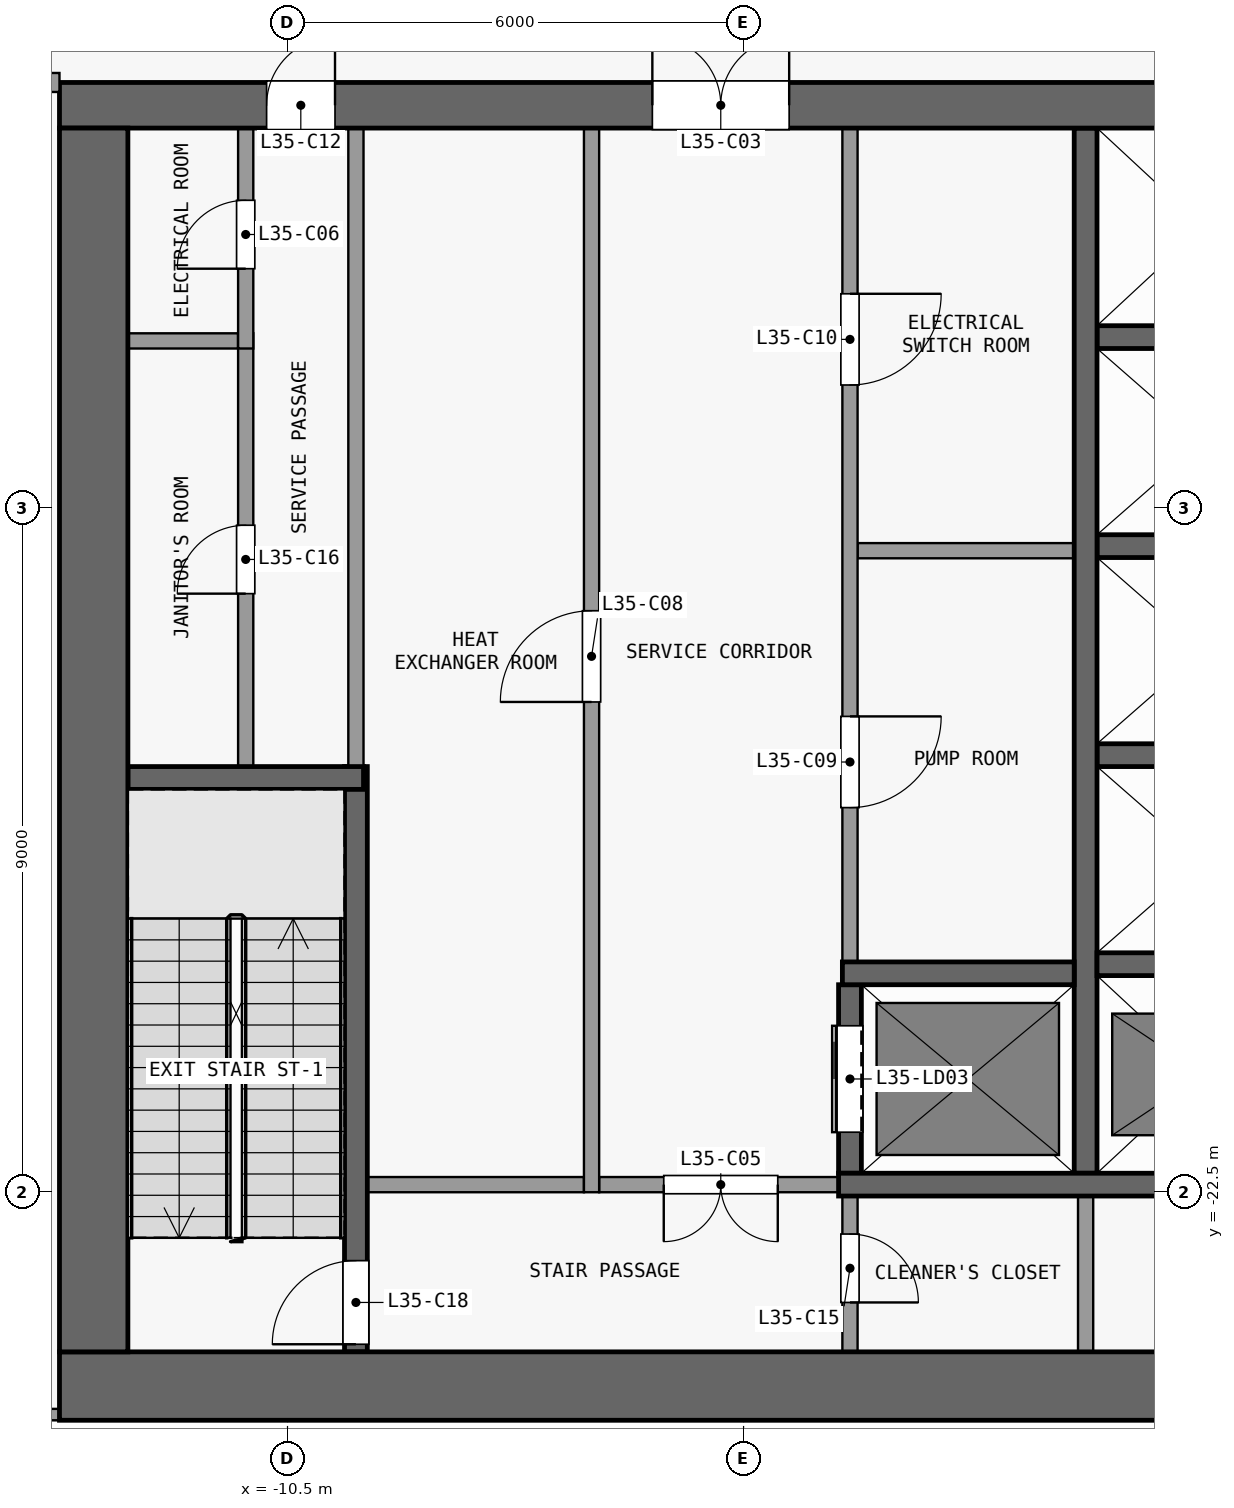
"""IFC4 building model, lengths in metres.
Left out: names, types, materials, properties, quantities, classifications, styles, units other than length and angle.
Written with IfcOpenShell. Run it as: python <this file> out.ifc"""

import sys

from ifc_helpers import new_model, si_unit, direction, frame, frame_2d, origin, place, context, subcontext, project, spatial, rectangle, extrude, element, fill, save


model = new_model("IFC4")
c1 = context("Model", 3, precision=1e-05, world=origin(), true_north=direction((0.0, 1.0)))
c2 = subcontext(c1, "Body", "Model", "MODEL_VIEW")
j1 = project(units=[si_unit("LENGTHUNIT", "METRE"), si_unit("PLANEANGLEUNIT", "RADIAN")], contexts=[c1])
p1 = place(None, origin())
s1 = spatial("IfcSite", under=j1, at=p1, CompositionType="ELEMENT")
p2 = place(p1, origin())
s2 = spatial("IfcBuilding", under=s1, at=p2, CompositionType="ELEMENT")
p3 = place(p2, frame((0.0, 0.0, 143.9)))
s3 = spatial("IfcBuildingStorey", under=s2, at=p3, CompositionType="ELEMENT", Elevation=143.9)
p4 = place(p3, frame((-13.5, -25.05, 0.0), z_axis=(0.0, 0.0, 1.0), x_axis=(1.0, 0.0, 0.0)))
e1 = element("IfcWall", 1, at=p4, inside=s3, PredefinedType="SHEAR", context=c2, shape_type="SweptSolid", body=[
    extrude(rectangle(XDim=27.0, YDim=0.9, at=frame_2d((13.5, 0.0))), origin(), (0.0, 0.0, 1.0), 5.0),
])
p5 = place(p3, frame((-13.5, -8.2, 0.0), z_axis=(0.0, 0.0, 1.0), x_axis=(1.0, 0.0, 0.0)))
e2 = element("IfcWall", 2, at=p5, inside=s3, PredefinedType="SHEAR", context=c2, shape_type="SweptSolid", body=[
    extrude(rectangle(XDim=27.0, YDim=0.6, at=frame_2d((13.5, 0.0))), origin(), (0.0, 0.0, 1.0), 5.0),
])
p6 = place(p5, frame((7.8, 0.0, 0.0)))
e3 = element("IfcOpeningElement", 3, at=p6, cuts=e2, PredefinedType="OPENING", context=c2, shape_type="SweptSolid", body=[
    extrude(rectangle(XDim=1.8, YDim=2.1, at=frame_2d((0.9, 1.05))), frame((0.0, 0.31, 0.0), z_axis=(0.0, -1.0, 0.0), x_axis=(1.0, 0.0, 0.0)), (0.0, 0.0, 1.0), 0.62),
])
p7 = place(p5, frame((17.4, 0.0, 0.0)))
e4 = element("IfcOpeningElement", 4, at=p7, cuts=e2, PredefinedType="OPENING", context=c2, shape_type="SweptSolid", body=[
    extrude(rectangle(XDim=1.8, YDim=2.1, at=frame_2d((0.9, 1.05))), frame((0.0, 0.31, 0.0), z_axis=(0.0, -1.0, 0.0), x_axis=(1.0, 0.0, 0.0)), (0.0, 0.0, 1.0), 0.62),
])
p8 = place(p5, frame((2.725, 0.0, 0.0)))
e5 = element("IfcOpeningElement", 5, at=p8, cuts=e2, PredefinedType="OPENING", context=c2, shape_type="SweptSolid", body=[
    extrude(rectangle(XDim=0.9, YDim=2.1, at=frame_2d((0.45, 1.05))), frame((0.0, 0.31, 0.0), z_axis=(0.0, -1.0, 0.0), x_axis=(1.0, 0.0, 0.0)), (0.0, 0.0, 1.0), 0.62),
])
p9 = place(p5, frame((23.375, 0.0, 0.0)))
e6 = element("IfcOpeningElement", 6, at=p9, cuts=e2, PredefinedType="OPENING", context=c2, shape_type="SweptSolid", body=[
    extrude(rectangle(XDim=0.9, YDim=2.1, at=frame_2d((0.45, 1.05))), frame((0.0, 0.31, 0.0), z_axis=(0.0, -1.0, 0.0), x_axis=(1.0, 0.0, 0.0)), (0.0, 0.0, 1.0), 0.62),
])
p10 = place(p3, frame((-13.05, -24.6, 0.0), z_axis=(0.0, 0.0, 1.0), x_axis=(0.0, 1.0, 0.0)))
e7 = element("IfcWall", 7, at=p10, inside=s3, PredefinedType="SHEAR", context=c2, shape_type="SweptSolid", body=[
    extrude(rectangle(XDim=16.1, YDim=0.9, at=frame_2d((8.05, 0.0))), origin(), (0.0, 0.0, 1.0), 5.0),
])
p11 = place(p3, frame((-9.45, -22.4, 0.0), z_axis=(0.0, 0.0, 1.0), x_axis=(1.0, 0.0, 0.0)))
e8 = element("IfcWall", 8, at=p11, inside=s3, PredefinedType="PARTITIONING", context=c2, shape_type="SweptSolid", body=[
    extrude(rectangle(XDim=2.85, YDim=0.2, at=frame_2d((1.425, 0.0))), origin(), (0.0, 0.0, 1.0), 5.0),
])
p12 = place(p3, frame((-3.25, -22.4, 0.0), z_axis=(0.0, 0.0, 1.0), x_axis=(-1.0, 0.0, 0.0)))
e9 = element("IfcWall", 9, at=p12, inside=s3, PredefinedType="PARTITIONING", context=c2, shape_type="SweptSolid", body=[
    extrude(rectangle(XDim=3.15, YDim=0.2, at=frame_2d((1.575, 0.0))), origin(), (0.0, 0.0, 1.0), 5.0),
])
p13 = place(p12, frame((0.8, 0.0, 0.0)))
e10 = element("IfcOpeningElement", 10, at=p13, cuts=e9, PredefinedType="OPENING", context=c2, shape_type="SweptSolid", body=[
    extrude(rectangle(XDim=1.5, YDim=2.1, at=frame_2d((0.75, 1.05))), frame((0.0, 0.11, 0.0), z_axis=(0.0, -1.0, 0.0), x_axis=(1.0, 0.0, 0.0)), (0.0, 0.0, 1.0), 0.22),
])
p14 = place(p3, frame((-3.25, -22.4, 0.0), z_axis=(0.0, 0.0, 1.0), x_axis=(1.0, 0.0, 0.0)))
e11 = element("IfcWall", 11, at=p14, inside=s3, PredefinedType="SHEAR", context=c2, shape_type="SweptSolid", body=[
    extrude(rectangle(XDim=6.2, YDim=0.3, at=frame_2d((3.1, 0.0))), origin(), (0.0, 0.0, 1.0), 5.0),
])
p15 = place(p3, frame((-3.2, -19.62, 0.0), z_axis=(0.0, 0.0, 1.0), x_axis=(1.0, 0.0, 0.0)))
e12 = element("IfcWall", 12, at=p15, inside=s3, PredefinedType="SHEAR", context=c2, shape_type="SweptSolid", body=[
    extrude(rectangle(XDim=3.05, YDim=0.3, at=frame_2d((1.525, 0.0))), origin(), (0.0, 0.0, 1.0), 5.0),
])
p16 = place(p3, frame((0.15, -19.5, 0.0), z_axis=(0.0, 0.0, 1.0), x_axis=(1.0, 0.0, 0.0)))
e13 = element("IfcWall", 13, at=p16, inside=s3, PredefinedType="SHEAR", context=c2, shape_type="SweptSolid", body=[
    extrude(rectangle(XDim=2.8, YDim=0.3, at=frame_2d((1.4, 0.0))), origin(), (0.0, 0.0, 1.0), 5.0),
])
p17 = place(p3, frame((-12.6, -17.05, 0.0), z_axis=(0.0, 0.0, 1.0), x_axis=(1.0, 0.0, 0.0)))
e14 = element("IfcWall", 14, at=p17, inside=s3, PredefinedType="SHEAR", context=c2, shape_type="SweptSolid", body=[
    extrude(rectangle(XDim=3.1, YDim=0.3, at=frame_2d((1.55, 0.0))), origin(), (0.0, 0.0, 1.0), 5.0),
])
p18 = place(p3, frame((0.15, -16.75, 0.0), z_axis=(0.0, 0.0, 1.0), x_axis=(1.0, 0.0, 0.0)))
e15 = element("IfcWall", 15, at=p18, inside=s3, PredefinedType="SHEAR", context=c2, shape_type="SweptSolid", body=[
    extrude(rectangle(XDim=2.8, YDim=0.3, at=frame_2d((1.4, 0.0))), origin(), (0.0, 0.0, 1.0), 5.0),
])
p19 = place(p3, frame((-3.0, -14.06, 0.0), z_axis=(0.0, 0.0, 1.0), x_axis=(1.0, 0.0, 0.0)))
e16 = element("IfcWall", 16, at=p19, inside=s3, PredefinedType="PARTITIONING", context=c2, shape_type="SweptSolid", body=[
    extrude(rectangle(XDim=2.85, YDim=0.2, at=frame_2d((1.425, 0.0))), origin(), (0.0, 0.0, 1.0), 5.0),
])
p20 = place(p3, frame((0.15, -14.0, 0.0), z_axis=(0.0, 0.0, 1.0), x_axis=(1.0, 0.0, 0.0)))
e17 = element("IfcWall", 17, at=p20, inside=s3, PredefinedType="SHEAR", context=c2, shape_type="SweptSolid", body=[
    extrude(rectangle(XDim=2.8, YDim=0.3, at=frame_2d((1.4, 0.0))), origin(), (0.0, 0.0, 1.0), 5.0),
])
p21 = place(p3, frame((-12.6, -11.3, 0.0), z_axis=(0.0, 0.0, 1.0), x_axis=(1.0, 0.0, 0.0)))
e18 = element("IfcWall", 18, at=p21, inside=s3, PredefinedType="PARTITIONING", context=c2, shape_type="SweptSolid", body=[
    extrude(rectangle(XDim=1.45, YDim=0.2, at=frame_2d((0.725, 0.0))), origin(), (0.0, 0.0, 1.0), 5.0),
])
p22 = place(p3, frame((0.15, -11.25, 0.0), z_axis=(0.0, 0.0, 1.0), x_axis=(1.0, 0.0, 0.0)))
e19 = element("IfcWall", 19, at=p22, inside=s3, PredefinedType="SHEAR", context=c2, shape_type="SweptSolid", body=[
    extrude(rectangle(XDim=2.8, YDim=0.3, at=frame_2d((1.4, 0.0))), origin(), (0.0, 0.0, 1.0), 5.0),
])
p23 = place(p3, frame((-11.05, -16.9, 0.0), z_axis=(0.0, 0.0, 1.0), x_axis=(0.0, 1.0, 0.0)))
e20 = element("IfcWall", 20, at=p23, inside=s3, PredefinedType="PARTITIONING", context=c2, shape_type="SweptSolid", body=[
    extrude(rectangle(XDim=5.7, YDim=0.2, at=frame_2d((2.85, 0.0))), origin(), (0.0, 0.0, 1.0), 5.0),
])
p24 = place(p23, frame((2.275, 0.0, 0.0)))
e21 = element("IfcOpeningElement", 21, at=p24, cuts=e20, PredefinedType="OPENING", context=c2, shape_type="SweptSolid", body=[
    extrude(rectangle(XDim=0.9, YDim=2.1, at=frame_2d((0.45, 1.05))), frame((0.0, 0.11, 0.0), z_axis=(0.0, -1.0, 0.0), x_axis=(1.0, 0.0, 0.0)), (0.0, 0.0, 1.0), 0.22),
])
p25 = place(p3, frame((-11.05, -11.4, 0.0), z_axis=(0.0, 0.0, 1.0), x_axis=(0.0, 1.0, 0.0)))
e22 = element("IfcWall", 22, at=p25, inside=s3, PredefinedType="PARTITIONING", context=c2, shape_type="SweptSolid", body=[
    extrude(rectangle(XDim=2.9, YDim=0.2, at=frame_2d((1.45, 0.0))), origin(), (0.0, 0.0, 1.0), 5.0),
])
p26 = place(p25, frame((1.05, 0.0, 0.0)))
e23 = element("IfcOpeningElement", 23, at=p26, cuts=e22, PredefinedType="OPENING", context=c2, shape_type="SweptSolid", body=[
    extrude(rectangle(XDim=0.9, YDim=2.1, at=frame_2d((0.45, 1.05))), frame((0.0, 0.11, 0.0), z_axis=(0.0, -1.0, 0.0), x_axis=(1.0, 0.0, 0.0)), (0.0, 0.0, 1.0), 0.22),
])
p27 = place(p3, frame((-9.6, -24.6, 0.0), z_axis=(0.0, 0.0, 1.0), x_axis=(0.0, 1.0, 0.0)))
e24 = element("IfcWall", 24, at=p27, inside=s3, PredefinedType="SHEAR", context=c2, shape_type="SweptSolid", body=[
    extrude(rectangle(XDim=7.7, YDim=0.3, at=frame_2d((3.85, 0.0))), origin(), (0.0, 0.0, 1.0), 5.0),
])
p28 = place(p27, frame((0.1, 0.0, 0.0)))
e25 = element("IfcOpeningElement", 25, at=p28, cuts=e24, PredefinedType="OPENING", context=c2, shape_type="SweptSolid", body=[
    extrude(rectangle(XDim=1.1, YDim=2.1, at=frame_2d((0.55, 1.05))), frame((0.0, 0.16, 0.0), z_axis=(0.0, -1.0, 0.0), x_axis=(1.0, 0.0, 0.0)), (0.0, 0.0, 1.0), 0.32),
])
p29 = place(p3, frame((-9.6, -16.9, 0.0), z_axis=(0.0, 0.0, 1.0), x_axis=(0.0, 1.0, 0.0)))
e26 = element("IfcWall", 26, at=p29, inside=s3, PredefinedType="PARTITIONING", context=c2, shape_type="SweptSolid", body=[
    extrude(rectangle(XDim=8.4, YDim=0.2, at=frame_2d((4.2, 0.0))), origin(), (0.0, 0.0, 1.0), 5.0),
])
p30 = place(p3, frame((-6.5, -22.5, 0.0), z_axis=(0.0, 0.0, 1.0), x_axis=(0.0, 1.0, 0.0)))
e27 = element("IfcWall", 27, at=p30, inside=s3, PredefinedType="PARTITIONING", context=c2, shape_type="SweptSolid", body=[
    extrude(rectangle(XDim=14.0, YDim=0.2, at=frame_2d((7.0, 0.0))), origin(), (0.0, 0.0, 1.0), 5.0),
])
p31 = place(p30, frame((6.45, 0.0, 0.0)))
e28 = element("IfcOpeningElement", 28, at=p31, cuts=e27, PredefinedType="OPENING", context=c2, shape_type="SweptSolid", body=[
    extrude(rectangle(XDim=1.2, YDim=2.1, at=frame_2d((0.6, 1.05))), frame((0.0, 0.11, 0.0), z_axis=(0.0, -1.0, 0.0), x_axis=(1.0, 0.0, 0.0)), (0.0, 0.0, 1.0), 0.22),
])
p32 = place(p3, frame((-3.1, -22.55, 0.0), z_axis=(0.0, 0.0, 1.0), x_axis=(0.0, -1.0, 0.0)))
e29 = element("IfcWall", 29, at=p32, inside=s3, PredefinedType="PARTITIONING", context=c2, shape_type="SweptSolid", body=[
    extrude(rectangle(XDim=2.05, YDim=0.2, at=frame_2d((1.025, 0.0))), origin(), (0.0, 0.0, 1.0), 5.0),
])
p33 = place(p32, frame((0.5, 0.0, 0.0)))
e30 = element("IfcOpeningElement", 30, at=p33, cuts=e29, PredefinedType="OPENING", context=c2, shape_type="SweptSolid", body=[
    extrude(rectangle(XDim=0.9, YDim=2.1, at=frame_2d((0.45, 1.05))), frame((0.0, 0.11, 0.0), z_axis=(0.0, -1.0, 0.0), x_axis=(1.0, 0.0, 0.0)), (0.0, 0.0, 1.0), 0.22),
])
p34 = place(p3, frame((-3.1, -22.25, 0.0), z_axis=(0.0, 0.0, 1.0), x_axis=(0.0, 1.0, 0.0)))
e31 = element("IfcWall", 31, at=p34, inside=s3, PredefinedType="SHEAR", context=c2, shape_type="SweptSolid", body=[
    extrude(rectangle(XDim=2.48, YDim=0.3, at=frame_2d((1.24, 0.0))), origin(), (0.0, 0.0, 1.0), 5.0),
])
p35 = place(p34, frame((0.54, 0.0, 0.0)))
e32 = element("IfcOpeningElement", 32, at=p35, cuts=e31, PredefinedType="OPENING", context=c2, shape_type="SweptSolid", body=[
    extrude(rectangle(XDim=1.4, YDim=2.1, at=frame_2d((0.7, 1.05))), frame((0.0, 0.16, 0.0), z_axis=(0.0, -1.0, 0.0), x_axis=(1.0, 0.0, 0.0)), (0.0, 0.0, 1.0), 0.32),
])
p36 = place(p3, frame((-3.1, -8.5, 0.0), z_axis=(0.0, 0.0, 1.0), x_axis=(0.0, -1.0, 0.0)))
e33 = element("IfcWall", 33, at=p36, inside=s3, PredefinedType="PARTITIONING", context=c2, shape_type="SweptSolid", body=[
    extrude(rectangle(XDim=10.97, YDim=0.2, at=frame_2d((5.485, 0.0))), origin(), (0.0, 0.0, 1.0), 5.0),
])
p37 = place(p36, frame((7.74, 0.0, 0.0)))
e34 = element("IfcOpeningElement", 34, at=p37, cuts=e33, PredefinedType="OPENING", context=c2, shape_type="SweptSolid", body=[
    extrude(rectangle(XDim=1.2, YDim=2.1, at=frame_2d((0.6, 1.05))), frame((0.0, 0.11, 0.0), z_axis=(0.0, -1.0, 0.0), x_axis=(1.0, 0.0, 0.0)), (0.0, 0.0, 1.0), 0.22),
])
p38 = place(p36, frame((2.18, 0.0, 0.0)))
e35 = element("IfcOpeningElement", 35, at=p38, cuts=e33, PredefinedType="OPENING", context=c2, shape_type="SweptSolid", body=[
    extrude(rectangle(XDim=1.2, YDim=2.1, at=frame_2d((0.6, 1.05))), frame((0.0, 0.11, 0.0), z_axis=(0.0, -1.0, 0.0), x_axis=(1.0, 0.0, 0.0)), (0.0, 0.0, 1.0), 0.22),
])
p39 = place(p3, frame((0.0, -24.6, 0.0), z_axis=(0.0, 0.0, 1.0), x_axis=(0.0, 1.0, 0.0)))
e36 = element("IfcWall", 36, at=p39, inside=s3, PredefinedType="PARTITIONING", context=c2, shape_type="SweptSolid", body=[
    extrude(rectangle(XDim=2.05, YDim=0.2, at=frame_2d((1.025, 0.0))), origin(), (0.0, 0.0, 1.0), 5.0),
])
p40 = place(p3, frame((0.0, -22.25, 0.0), z_axis=(0.0, 0.0, 1.0), x_axis=(0.0, 1.0, 0.0)))
e37 = element("IfcWall", 37, at=p40, inside=s3, PredefinedType="SHEAR", context=c2, shape_type="SweptSolid", body=[
    extrude(rectangle(XDim=13.75, YDim=0.3, at=frame_2d((6.875, 0.0))), origin(), (0.0, 0.0, 1.0), 5.0),
])
p41 = place(p3, frame((-13.5, -25.425, 0.0), z_axis=(0.0, 0.0, 1.0), x_axis=(-1.0, 0.0, 0.0)))
e38 = element("IfcWall", 38, at=p41, inside=s3, PredefinedType="SOLIDWALL", context=c2, shape_type="SweptSolid", body=[
    extrude(rectangle(XDim=8.5, YDim=0.15, at=frame_2d((4.25, 0.0))), origin(), (0.0, 0.0, 1.0), 5.0),
])
p42 = place(p41, frame((3.95, 0.0, 1.2)))
e39 = element("IfcOpeningElement", 39, at=p42, cuts=e38, PredefinedType="OPENING", context=c2, shape_type="SweptSolid", body=[
    extrude(rectangle(XDim=3.6, YDim=3.0, at=frame_2d((1.8, 1.5))), frame((0.0, 0.085, 0.0), z_axis=(0.0, -1.0, 0.0), x_axis=(1.0, 0.0, 0.0)), (0.0, 0.0, 1.0), 0.17),
])
p43 = place(p41, frame((0.5, 0.0, 1.2)))
e40 = element("IfcOpeningElement", 40, at=p43, cuts=e38, PredefinedType="OPENING", context=c2, shape_type="SweptSolid", body=[
    extrude(rectangle(XDim=2.0, YDim=3.0, at=frame_2d((1.0, 1.5))), frame((0.0, 0.085, 0.0), z_axis=(0.0, -1.0, 0.0), x_axis=(1.0, 0.0, 0.0)), (0.0, 0.0, 1.0), 0.17),
])
p44 = place(p3, frame((-25.35, -7.9, 0.0), z_axis=(0.0, 0.0, 1.0), x_axis=(1.0, 0.0, 0.0)))
e41 = element("IfcWall", 41, at=p44, inside=s3, PredefinedType="PARTITIONING", context=c2, shape_type="SweptSolid", body=[
    extrude(rectangle(XDim=11.85, YDim=0.25, at=frame_2d((5.925, 0.0))), origin(), (0.0, 0.0, 1.0), 5.0),
])
p45 = place(p44, frame((5.3, 0.0, 0.0)))
e42 = element("IfcOpeningElement", 42, at=p45, cuts=e41, PredefinedType="OPENING", context=c2, shape_type="SweptSolid", body=[
    extrude(rectangle(XDim=1.2, YDim=2.1, at=frame_2d((0.6, 1.05))), frame((0.0, 0.135, 0.0), z_axis=(0.0, -1.0, 0.0), x_axis=(1.0, 0.0, 0.0)), (0.0, 0.0, 1.0), 0.27),
])
p46 = place(p35, origin())
e43 = element("IfcDoor", 43, at=p46, inside=s3, OperationType="DOUBLE_DOOR_SLIDING", PredefinedType="DOOR", context=c2, shape_type="SweptSolid", body=[
    extrude(rectangle(XDim=1.4, YDim=2.1, at=frame_2d((0.7, 1.05))), frame((0.0, 0.025, 0.0), z_axis=(0.0, -1.0, 0.0), x_axis=(1.0, 0.0, 0.0)), (0.0, 0.0, 1.0), 0.05),
])
fill(e32, e43)
p47 = place(p6, origin())
e44 = element("IfcDoor", 44, at=p47, inside=s3, OperationType="DOUBLE_DOOR_SINGLE_SWING", PredefinedType="DOOR", context=c2, shape_type="SweptSolid", body=[
    extrude(rectangle(XDim=1.8, YDim=2.1, at=frame_2d((0.9, 1.05))), frame((0.0, 0.025, 0.0), z_axis=(0.0, -1.0, 0.0), x_axis=(1.0, 0.0, 0.0)), (0.0, 0.0, 1.0), 0.05),
])
fill(e3, e44)
p48 = place(p13, origin())
e45 = element("IfcDoor", 45, at=p48, inside=s3, OperationType="DOUBLE_DOOR_SINGLE_SWING", PredefinedType="DOOR", context=c2, shape_type="SweptSolid", body=[
    extrude(rectangle(XDim=1.5, YDim=2.1, at=frame_2d((0.75, 1.05))), frame((0.0, 0.025, 0.0), z_axis=(0.0, -1.0, 0.0), x_axis=(1.0, 0.0, 0.0)), (0.0, 0.0, 1.0), 0.05),
])
fill(e10, e45)
p49 = place(p26, origin())
e46 = element("IfcDoor", 46, at=p49, inside=s3, OperationType="SINGLE_SWING_LEFT", PredefinedType="DOOR", context=c2, shape_type="SweptSolid", body=[
    extrude(rectangle(XDim=0.9, YDim=2.1, at=frame_2d((0.45, 1.05))), frame((0.0, 0.025, 0.0), z_axis=(0.0, -1.0, 0.0), x_axis=(1.0, 0.0, 0.0)), (0.0, 0.0, 1.0), 0.05),
])
fill(e23, e46)
p50 = place(p31, origin())
e47 = element("IfcDoor", 47, at=p50, inside=s3, OperationType="SINGLE_SWING_LEFT", PredefinedType="DOOR", context=c2, shape_type="SweptSolid", body=[
    extrude(rectangle(XDim=1.2, YDim=2.1, at=frame_2d((0.6, 1.05))), frame((0.0, 0.025, 0.0), z_axis=(0.0, -1.0, 0.0), x_axis=(1.0, 0.0, 0.0)), (0.0, 0.0, 1.0), 0.05),
])
fill(e28, e47)
p51 = place(p37, origin())
e48 = element("IfcDoor", 48, at=p51, inside=s3, OperationType="SINGLE_SWING_LEFT", PredefinedType="DOOR", context=c2, shape_type="SweptSolid", body=[
    extrude(rectangle(XDim=1.2, YDim=2.1, at=frame_2d((0.6, 1.05))), frame((0.0, 0.025, 0.0), z_axis=(0.0, -1.0, 0.0), x_axis=(1.0, 0.0, 0.0)), (0.0, 0.0, 1.0), 0.05),
])
fill(e34, e48)
p52 = place(p38, origin())
e49 = element("IfcDoor", 49, at=p52, inside=s3, OperationType="SINGLE_SWING_LEFT", PredefinedType="DOOR", context=c2, shape_type="SweptSolid", body=[
    extrude(rectangle(XDim=1.2, YDim=2.1, at=frame_2d((0.6, 1.05))), frame((0.0, 0.025, 0.0), z_axis=(0.0, -1.0, 0.0), x_axis=(1.0, 0.0, 0.0)), (0.0, 0.0, 1.0), 0.05),
])
fill(e35, e49)
p53 = place(p8, origin())
e50 = element("IfcDoor", 50, at=p53, inside=s3, OperationType="SINGLE_SWING_RIGHT", PredefinedType="DOOR", context=c2, shape_type="SweptSolid", body=[
    extrude(rectangle(XDim=0.9, YDim=2.1, at=frame_2d((0.45, 1.05))), frame((0.0, 0.025, 0.0), z_axis=(0.0, -1.0, 0.0), x_axis=(1.0, 0.0, 0.0)), (0.0, 0.0, 1.0), 0.05),
])
fill(e5, e50)
p54 = place(p33, origin())
e51 = element("IfcDoor", 51, at=p54, inside=s3, OperationType="SINGLE_SWING_RIGHT", PredefinedType="DOOR", context=c2, shape_type="SweptSolid", body=[
    extrude(rectangle(XDim=0.9, YDim=2.1, at=frame_2d((0.45, 1.05))), frame((0.0, 0.025, 0.0), z_axis=(0.0, -1.0, 0.0), x_axis=(1.0, 0.0, 0.0)), (0.0, 0.0, 1.0), 0.05),
])
fill(e30, e51)
p55 = place(p24, origin())
e52 = element("IfcDoor", 52, at=p55, inside=s3, OperationType="SINGLE_SWING_LEFT", PredefinedType="DOOR", context=c2, shape_type="SweptSolid", body=[
    extrude(rectangle(XDim=0.9, YDim=2.1, at=frame_2d((0.45, 1.05))), frame((0.0, 0.025, 0.0), z_axis=(0.0, -1.0, 0.0), x_axis=(1.0, 0.0, 0.0)), (0.0, 0.0, 1.0), 0.05),
])
fill(e21, e52)
p56 = place(p28, origin())
e53 = element("IfcDoor", 53, at=p56, inside=s3, OperationType="SINGLE_SWING_LEFT", PredefinedType="DOOR", context=c2, shape_type="SweptSolid", body=[
    extrude(rectangle(XDim=1.1, YDim=2.1, at=frame_2d((0.55, 1.05))), frame((0.0, 0.025, 0.0), z_axis=(0.0, -1.0, 0.0), x_axis=(1.0, 0.0, 0.0)), (0.0, 0.0, 1.0), 0.05),
])
fill(e25, e53)
save(model, sys.argv[1])
